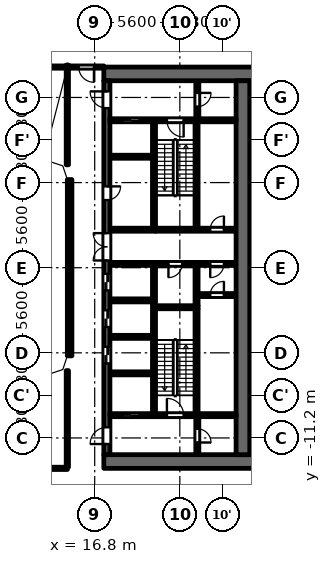
"""IFC4 building model, lengths in metres.
Left out: names, types, materials, properties, quantities, classifications, styles, units other than length and angle.
Written with IfcOpenShell. Run it as: python <this file> out.ifc"""

import sys

from ifc_helpers import new_model, si_unit, direction, frame, frame_2d, origin, place, context, subcontext, project, spatial, polyline, rectangle, outline, extrude, element, fill, save


model = new_model("IFC4")
c1 = context("Model", 3, precision=1e-05, world=origin(), true_north=direction((0.0, 1.0)))
c2 = subcontext(c1, "Body", "Model", "MODEL_VIEW")
j1 = project(units=[si_unit("LENGTHUNIT", "METRE"), si_unit("PLANEANGLEUNIT", "RADIAN")], contexts=[c1])
p1 = place(None, origin())
s1 = spatial("IfcSite", under=j1, at=p1, CompositionType="ELEMENT")
p2 = place(p1, origin())
s2 = spatial("IfcBuilding", under=s1, at=p2, CompositionType="ELEMENT")
p3 = place(p2, frame((0.0, 0.0, 16.1)))
s3 = spatial("IfcBuildingStorey", under=s2, at=p3, CompositionType="ELEMENT", Elevation=16.1)
p4 = place(p3, frame((15.15, 5.8, 0.0), z_axis=(0.0, 0.0, 1.0), x_axis=(0.0, -1.0, 0.0)))
e1 = element("IfcWall", 1, at=p4, inside=s3, PredefinedType="SOLIDWALL", context=c2, shape_type="SweptSolid", body=[
    extrude(rectangle(XDim=11.6, YDim=0.3, at=frame_2d((5.8, 0.0))), origin(), (0.0, 0.0, 1.0), 4.45),
])
p5 = place(p3, frame((23.5, -2.5, 0.0), z_axis=(0.0, 0.0, 1.0), x_axis=(0.0, 1.0, 0.0)))
e2 = element("IfcWall", 2, at=p5, inside=s3, PredefinedType="PARTITIONING", context=c2, shape_type="SweptSolid", body=[
    extrude(rectangle(XDim=2.65, YDim=0.2, at=frame_2d((1.325, 0.0))), origin(), (0.0, 0.0, 1.0), 4.45),
])
p6 = place(p3, frame((20.7, 2.6, 0.0), z_axis=(0.0, 0.0, 1.0), x_axis=(0.0, 1.0, 0.0)))
e3 = element("IfcWall", 3, at=p6, inside=s3, PredefinedType="SHEAR", context=c2, shape_type="SweptSolid", body=[
    extrude(rectangle(XDim=7.0, YDim=0.2, at=frame_2d((3.5, 0.0))), origin(), (0.0, 0.0, 1.0), 4.45),
])
p7 = place(p3, frame((20.7, -9.6, 0.0), z_axis=(0.0, 0.0, 1.0), x_axis=(0.0, 1.0, 0.0)))
e4 = element("IfcWall", 4, at=p7, inside=s3, PredefinedType="SHEAR", context=c2, shape_type="SweptSolid", body=[
    extrude(rectangle(XDim=9.75, YDim=0.2, at=frame_2d((4.875, 0.0))), origin(), (0.0, 0.0, 1.0), 4.45),
])
p8 = place(p3, frame((20.8, 2.5, 0.0), z_axis=(0.0, 0.0, 1.0), x_axis=(1.0, 0.0, 0.0)))
e5 = element("IfcWall", 5, at=p8, inside=s3, PredefinedType="SHEAR", context=c2, shape_type="SweptSolid", body=[
    extrude(rectangle(XDim=5.3, YDim=0.2, at=frame_2d((2.65, 0.0))), origin(), (0.0, 0.0, 1.0), 4.45),
])
p9 = place(p8, frame((3.6, 0.0, 0.0)))
e6 = element("IfcOpeningElement", 6, at=p9, cuts=e5, PredefinedType="OPENING", context=c2, shape_type="SweptSolid", body=[
    extrude(rectangle(XDim=0.9, YDim=2.1, at=frame_2d((0.45, 1.05))), frame((0.0, 0.11, 0.0), z_axis=(0.0, -1.0, 0.0), x_axis=(1.0, 0.0, 0.0)), (0.0, 0.0, 1.0), 0.22),
])
p10 = place(p3, frame((20.8, 0.25, 0.0), z_axis=(0.0, 0.0, 1.0), x_axis=(1.0, 0.0, 0.0)))
e7 = element("IfcWall", 7, at=p10, inside=s3, PredefinedType="PARTITIONING", context=c2, shape_type="SweptSolid", body=[
    extrude(rectangle(XDim=5.3, YDim=0.2, at=frame_2d((2.65, 0.0))), origin(), (0.0, 0.0, 1.0), 4.45),
])
p11 = place(p10, frame((0.85, 0.0, 0.0)))
e8 = element("IfcOpeningElement", 8, at=p11, cuts=e7, PredefinedType="OPENING", context=c2, shape_type="SweptSolid", body=[
    extrude(rectangle(XDim=0.9, YDim=2.1, at=frame_2d((0.45, 1.05))), frame((0.0, 0.11, 0.0), z_axis=(0.0, -1.0, 0.0), x_axis=(1.0, 0.0, 0.0)), (0.0, 0.0, 1.0), 0.22),
])
p12 = place(p10, frame((3.6, 0.0, 0.0)))
e9 = element("IfcOpeningElement", 9, at=p12, cuts=e7, PredefinedType="OPENING", context=c2, shape_type="SweptSolid", body=[
    extrude(rectangle(XDim=0.9, YDim=2.1, at=frame_2d((0.45, 1.05))), frame((0.0, 0.11, 0.0), z_axis=(0.0, -1.0, 0.0), x_axis=(1.0, 0.0, 0.0)), (0.0, 0.0, 1.0), 0.22),
])
for number, where, z_axis, x_axis in (
    (10, (17.4, 12.75, 0.0), (0.0, 0.0, 1.0), (1.0, 0.0, 0.0)),
    (11, (17.4, -12.75, 0.0), (0.0, 0.0, 1.0), (1.0, 0.0, 0.0)),
):
    element("IfcWall", number, at=place(p3, frame(where, z_axis=z_axis, x_axis=x_axis)), inside=s3, PredefinedType="SHEAR", context=c2, shape_type="SweptSolid", body=[
        extrude(rectangle(XDim=10.4, YDim=0.9, at=frame_2d((5.2, 0.0))), origin(), (0.0, 0.0, 1.0), 4.45),
    ])
p13 = place(p3, frame((17.6, -12.3, 0.0), z_axis=(0.0, 0.0, 1.0), x_axis=(0.0, 1.0, 0.0)))
e12 = element("IfcWall", 12, at=p13, inside=s3, PredefinedType="SHEAR", context=c2, shape_type="SweptSolid", body=[
    extrude(rectangle(XDim=24.6, YDim=0.4, at=frame_2d((12.3, 0.0))), origin(), (0.0, 0.0, 1.0), 4.45),
])
p14 = place(p13, frame((6.0, 0.0, 0.0)))
e13 = element("IfcOpeningElement", 13, at=p14, cuts=e12, PredefinedType="OPENING", context=c2, shape_type="SweptSolid", body=[
    extrude(rectangle(XDim=1.1, YDim=2.1, at=frame_2d((0.55, 1.05))), frame((0.0, 0.21, 0.0), z_axis=(0.0, -1.0, 0.0), x_axis=(1.0, 0.0, 0.0)), (0.0, 0.0, 1.0), 0.42),
])
p15 = place(p13, frame((8.4, 0.0, 0.0)))
e14 = element("IfcOpeningElement", 14, at=p15, cuts=e12, PredefinedType="OPENING", context=c2, shape_type="SweptSolid", body=[
    extrude(rectangle(XDim=1.1, YDim=2.1, at=frame_2d((0.55, 1.05))), frame((0.0, 0.21, 0.0), z_axis=(0.0, -1.0, 0.0), x_axis=(1.0, 0.0, 0.0)), (0.0, 0.0, 1.0), 0.42),
])
p16 = place(p13, frame((10.8, 0.0, 0.0)))
e15 = element("IfcOpeningElement", 15, at=p16, cuts=e12, PredefinedType="OPENING", context=c2, shape_type="SweptSolid", body=[
    extrude(rectangle(XDim=1.1, YDim=2.1, at=frame_2d((0.55, 1.05))), frame((0.0, 0.21, 0.0), z_axis=(0.0, -1.0, 0.0), x_axis=(1.0, 0.0, 0.0)), (0.0, 0.0, 1.0), 0.42),
])
p17 = place(p13, frame((16.75, 0.0, 0.0)))
e16 = element("IfcOpeningElement", 16, at=p17, cuts=e12, PredefinedType="OPENING", context=c2, shape_type="SweptSolid", body=[
    extrude(rectangle(XDim=0.9, YDim=2.1, at=frame_2d((0.45, 1.05))), frame((0.0, 0.21, 0.0), z_axis=(0.0, -1.0, 0.0), x_axis=(1.0, 0.0, 0.0)), (0.0, 0.0, 1.0), 0.42),
])
p18 = place(p13, frame((22.8, 0.0, 0.0)))
e17 = element("IfcOpeningElement", 17, at=p18, cuts=e12, PredefinedType="OPENING", context=c2, shape_type="SweptSolid", body=[
    extrude(rectangle(XDim=1.1, YDim=2.1, at=frame_2d((0.55, 1.05))), frame((0.0, 0.21, 0.0), z_axis=(0.0, -1.0, 0.0), x_axis=(1.0, 0.0, 0.0)), (0.0, 0.0, 1.0), 0.42),
])
p19 = place(p13, frame((0.7, 0.0, 0.0)))
e18 = element("IfcOpeningElement", 18, at=p19, cuts=e12, PredefinedType="OPENING", context=c2, shape_type="SweptSolid", body=[
    extrude(rectangle(XDim=1.1, YDim=2.1, at=frame_2d((0.55, 1.05))), frame((0.0, 0.21, 0.0), z_axis=(0.0, -1.0, 0.0), x_axis=(1.0, 0.0, 0.0)), (0.0, 0.0, 1.0), 0.42),
])
p20 = place(p13, frame((12.775, 0.0, 0.0)))
e19 = element("IfcOpeningElement", 19, at=p20, cuts=e12, PredefinedType="OPENING", context=c2, shape_type="SweptSolid", body=[
    extrude(rectangle(XDim=1.8, YDim=2.1, at=frame_2d((0.9, 1.05))), frame((0.0, 0.21, 0.0), z_axis=(0.0, -1.0, 0.0), x_axis=(1.0, 0.0, 0.0)), (0.0, 0.0, 1.0), 0.42),
])
p21 = place(p3, frame((26.55, -12.3, 0.0), z_axis=(0.0, 0.0, 1.0), x_axis=(0.0, 1.0, 0.0)))
e20 = element("IfcWall", 20, at=p21, inside=s3, PredefinedType="SHEAR", context=c2, shape_type="SweptSolid", body=[
    extrude(rectangle(XDim=24.6, YDim=0.9, at=frame_2d((12.3, 0.0))), origin(), (0.0, 0.0, 1.0), 4.45),
])
p22 = place(p3, frame((23.55, 9.8, 0.0), z_axis=(0.0, 0.0, 1.0), x_axis=(0.0, 1.0, 0.0)))
e21 = element("IfcWall", 21, at=p22, inside=s3, PredefinedType="PARTITIONING", context=c2, shape_type="SweptSolid", body=[
    extrude(rectangle(XDim=2.5, YDim=0.2, at=frame_2d((1.25, 0.0))), origin(), (0.0, 0.0, 1.0), 4.45),
])
p23 = place(p22, frame((0.8, 0.0, 0.0)))
e22 = element("IfcOpeningElement", 22, at=p23, cuts=e21, PredefinedType="OPENING", context=c2, shape_type="SweptSolid", body=[
    extrude(rectangle(XDim=0.9, YDim=2.1, at=frame_2d((0.45, 1.05))), frame((0.0, 0.11, 0.0), z_axis=(0.0, -1.0, 0.0), x_axis=(1.0, 0.0, 0.0)), (0.0, 0.0, 1.0), 0.22),
])
p24 = place(p3, frame((23.55, -12.3, 0.0), z_axis=(0.0, 0.0, 1.0), x_axis=(0.0, 1.0, 0.0)))
e23 = element("IfcWall", 23, at=p24, inside=s3, PredefinedType="PARTITIONING", context=c2, shape_type="SweptSolid", body=[
    extrude(rectangle(XDim=2.5, YDim=0.2, at=frame_2d((1.25, 0.0))), origin(), (0.0, 0.0, 1.0), 4.45),
])
p25 = place(p24, frame((0.8, 0.0, 0.0)))
e24 = element("IfcOpeningElement", 24, at=p25, cuts=e23, PredefinedType="OPENING", context=c2, shape_type="SweptSolid", body=[
    extrude(rectangle(XDim=0.9, YDim=2.1, at=frame_2d((0.45, 1.05))), frame((0.0, 0.11, 0.0), z_axis=(0.0, -1.0, 0.0), x_axis=(1.0, 0.0, 0.0)), (0.0, 0.0, 1.0), 0.22),
])
p26 = place(p3, frame((23.6, -1.8, 0.0), z_axis=(0.0, 0.0, 1.0), x_axis=(1.0, 0.0, 0.0)))
e25 = element("IfcWall", 25, at=p26, inside=s3, PredefinedType="PARTITIONING", context=c2, shape_type="SweptSolid", body=[
    extrude(rectangle(XDim=2.5, YDim=0.2, at=frame_2d((1.25, 0.0))), origin(), (0.0, 0.0, 1.0), 4.45),
])
p27 = place(p26, frame((0.8, 0.0, 0.0)))
e26 = element("IfcOpeningElement", 26, at=p27, cuts=e25, PredefinedType="OPENING", context=c2, shape_type="SweptSolid", body=[
    extrude(rectangle(XDim=0.9, YDim=2.1, at=frame_2d((0.45, 1.05))), frame((0.0, 0.11, 0.0), z_axis=(0.0, -1.0, 0.0), x_axis=(1.0, 0.0, 0.0)), (0.0, 0.0, 1.0), 0.22),
])
p28 = place(p3, frame((17.8, -9.7, 0.0), z_axis=(0.0, 0.0, 1.0), x_axis=(1.0, 0.0, 0.0)))
e27 = element("IfcWall", 27, at=p28, inside=s3, PredefinedType="SHEAR", context=c2, shape_type="SweptSolid", body=[
    extrude(rectangle(XDim=8.3, YDim=0.2, at=frame_2d((4.15, 0.0))), origin(), (0.0, 0.0, 1.0), 4.45),
])
p29 = place(p28, frame((0.85, 0.0, 0.0)))
e28 = element("IfcOpeningElement", 28, at=p29, cuts=e27, PredefinedType="OPENING", context=c2, shape_type="SweptSolid", body=[
    extrude(rectangle(XDim=1.1, YDim=2.1, at=frame_2d((0.55, 1.05))), frame((0.0, 0.11, 0.0), z_axis=(0.0, -1.0, 0.0), x_axis=(1.0, 0.0, 0.0)), (0.0, 0.0, 1.0), 0.22),
])
p30 = place(p28, frame((3.75, 0.0, 0.0)))
e29 = element("IfcOpeningElement", 29, at=p30, cuts=e27, PredefinedType="OPENING", context=c2, shape_type="SweptSolid", body=[
    extrude(rectangle(XDim=1.1, YDim=2.1, at=frame_2d((0.55, 1.05))), frame((0.0, 0.11, 0.0), z_axis=(0.0, -1.0, 0.0), x_axis=(1.0, 0.0, 0.0)), (0.0, 0.0, 1.0), 0.22),
])
for number, where, z_axis, x_axis in (
    (30, (17.8, -6.95, 0.0), (0.0, 0.0, 1.0), (1.0, 0.0, 0.0)),
    (31, (17.8, -4.55, 0.0), (0.0, 0.0, 1.0), (1.0, 0.0, 0.0)),
    (32, (17.8, -2.15, 0.0), (0.0, 0.0, 1.0), (1.0, 0.0, 0.0)),
):
    element("IfcWall", number, at=place(p3, frame(where, z_axis=z_axis, x_axis=x_axis)), inside=s3, PredefinedType="PARTITIONING", context=c2, shape_type="SweptSolid", body=[
        extrude(rectangle(XDim=2.8, YDim=0.2, at=frame_2d((1.4, 0.0))), origin(), (0.0, 0.0, 1.0), 4.45),
    ])
for number, where, z_axis, x_axis in (
    (33, (17.8, 0.25, 0.0), (0.0, 0.0, 1.0), (1.0, 0.0, 0.0)),
    (34, (17.8, 2.5, 0.0), (0.0, 0.0, 1.0), (1.0, 0.0, 0.0)),
):
    element("IfcWall", number, at=place(p3, frame(where, z_axis=z_axis, x_axis=x_axis)), inside=s3, PredefinedType="PARTITIONING", context=c2, shape_type="SweptSolid", body=[
        extrude(rectangle(XDim=3.0, YDim=0.2, at=frame_2d((1.5, 0.0))), origin(), (0.0, 0.0, 1.0), 4.45),
    ])
p31 = place(p3, frame((17.8, 7.3, 0.0), z_axis=(0.0, 0.0, 1.0), x_axis=(1.0, 0.0, 0.0)))
e35 = element("IfcWall", 35, at=p31, inside=s3, PredefinedType="PARTITIONING", context=c2, shape_type="SweptSolid", body=[
    extrude(rectangle(XDim=2.8, YDim=0.2, at=frame_2d((1.4, 0.0))), origin(), (0.0, 0.0, 1.0), 4.45),
])
p32 = place(p3, frame((17.8, 9.7, 0.0), z_axis=(0.0, 0.0, 1.0), x_axis=(1.0, 0.0, 0.0)))
e36 = element("IfcWall", 36, at=p32, inside=s3, PredefinedType="SHEAR", context=c2, shape_type="SweptSolid", body=[
    extrude(rectangle(XDim=8.3, YDim=0.2, at=frame_2d((4.15, 0.0))), origin(), (0.0, 0.0, 1.0), 4.45),
])
p33 = place(p32, frame((0.85, 0.0, 0.0)))
e37 = element("IfcOpeningElement", 37, at=p33, cuts=e36, PredefinedType="OPENING", context=c2, shape_type="SweptSolid", body=[
    extrude(rectangle(XDim=1.1, YDim=2.1, at=frame_2d((0.55, 1.05))), frame((0.0, 0.11, 0.0), z_axis=(0.0, -1.0, 0.0), x_axis=(1.0, 0.0, 0.0)), (0.0, 0.0, 1.0), 0.22),
])
p34 = place(p32, frame((3.75, 0.0, 0.0)))
e38 = element("IfcOpeningElement", 38, at=p34, cuts=e36, PredefinedType="OPENING", context=c2, shape_type="SweptSolid", body=[
    extrude(rectangle(XDim=1.1, YDim=2.1, at=frame_2d((0.55, 1.05))), frame((0.0, 0.11, 0.0), z_axis=(0.0, -1.0, 0.0), x_axis=(1.0, 0.0, 0.0)), (0.0, 0.0, 1.0), 0.22),
])
p35 = place(p3, frame((23.5, 2.6, 0.0), z_axis=(0.0, 0.0, 1.0), x_axis=(0.0, 1.0, 0.0)))
e39 = element("IfcWall", 39, at=p35, inside=s3, PredefinedType="SHEAR", context=c2, shape_type="SweptSolid", body=[
    extrude(rectangle(XDim=7.0, YDim=0.2, at=frame_2d((3.5, 0.0))), origin(), (0.0, 0.0, 1.0), 4.45),
])
p36 = place(p3, frame((23.5, -9.6, 0.0), z_axis=(0.0, 0.0, 1.0), x_axis=(0.0, 1.0, 0.0)))
e40 = element("IfcWall", 40, at=p36, inside=s3, PredefinedType="SHEAR", context=c2, shape_type="SweptSolid", body=[
    extrude(rectangle(XDim=6.9, YDim=0.2, at=frame_2d((3.45, 0.0))), origin(), (0.0, 0.0, 1.0), 4.45),
])
p37 = place(p3, frame((20.8, -2.6, 0.0), z_axis=(0.0, 0.0, 1.0), x_axis=(1.0, 0.0, 0.0)))
e41 = element("IfcWall", 41, at=p37, inside=s3, PredefinedType="SHEAR", context=c2, shape_type="SweptSolid", body=[
    extrude(rectangle(XDim=2.8, YDim=0.2, at=frame_2d((1.4, 0.0))), origin(), (0.0, 0.0, 1.0), 4.45),
])
p38 = place(p3, frame((-15.005, -13.2, 0.0), z_axis=(0.0, 0.0, 1.0), x_axis=(1.0, 0.0, 0.0)))
e42 = element("IfcWall", 42, at=p38, inside=s3, PredefinedType="PARTITIONING", context=c2, shape_type="SweptSolid", body=[
    extrude(rectangle(XDim=30.01, YDim=0.15, at=frame_2d((15.005, 0.0))), origin(), (0.0, 0.0, 1.0), 4.45),
])
p39 = place(p38, frame((16.855, 0.0, 0.0)))
e43 = element("IfcOpeningElement", 43, at=p39, cuts=e42, PredefinedType="OPENING", context=c2, shape_type="SweptSolid", body=[
    extrude(rectangle(XDim=1.8, YDim=2.1, at=frame_2d((0.9, 1.05))), frame((0.0, 0.085, 0.0), z_axis=(0.0, -1.0, 0.0), x_axis=(1.0, 0.0, 0.0)), (0.0, 0.0, 1.0), 0.17),
])
p40 = place(p3, frame((-17.4, 13.2, 0.0), z_axis=(0.0, 0.0, 1.0), x_axis=(1.0, 0.0, 0.0)))
e44 = element("IfcWall", 44, at=p40, inside=s3, PredefinedType="PARTITIONING", context=c2, shape_type="SweptSolid", body=[
    extrude(rectangle(XDim=34.8, YDim=0.15, at=frame_2d((17.4, 0.0))), origin(), (0.0, 0.0, 1.0), 4.45),
])
p41 = place(p40, frame((3.05, 0.0, 0.0)))
e45 = element("IfcOpeningElement", 45, at=p41, cuts=e44, PredefinedType="OPENING", context=c2, shape_type="SweptSolid", body=[
    extrude(rectangle(XDim=1.8, YDim=2.1, at=frame_2d((0.9, 1.05))), frame((0.0, 0.085, 0.0), z_axis=(0.0, -1.0, 0.0), x_axis=(1.0, 0.0, 0.0)), (0.0, 0.0, 1.0), 0.17),
])
p42 = place(p40, frame((0.75, 0.0, 0.0)))
e46 = element("IfcOpeningElement", 46, at=p42, cuts=e44, PredefinedType="OPENING", context=c2, shape_type="SweptSolid", body=[
    extrude(rectangle(XDim=1.0, YDim=2.1, at=frame_2d((0.5, 1.05))), frame((0.0, 0.085, 0.0), z_axis=(0.0, -1.0, 0.0), x_axis=(1.0, 0.0, 0.0)), (0.0, 0.0, 1.0), 0.17),
])
p43 = place(p40, frame((33.15, 0.0, 0.0)))
e47 = element("IfcOpeningElement", 47, at=p43, cuts=e44, PredefinedType="OPENING", context=c2, shape_type="SweptSolid", body=[
    extrude(rectangle(XDim=1.0, YDim=2.1, at=frame_2d((0.5, 1.05))), frame((0.0, 0.085, 0.0), z_axis=(0.0, -1.0, 0.0), x_axis=(1.0, 0.0, 0.0)), (0.0, 0.0, 1.0), 0.17),
])
for number, where, z_axis, x_axis in (
    (48, (15.0, -13.125, 0.0), (0.0, 0.0, 1.0), (0.0, 1.0, 0.0)),
    (49, (15.0, 6.769, 0.0), (0.0, 0.0, 1.0), (0.0, 1.0, 0.0)),
):
    element("IfcWall", number, at=place(p3, frame(where, z_axis=z_axis, x_axis=x_axis)), inside=s3, PredefinedType="PARTITIONING", context=c2, shape_type="SweptSolid", body=[
        extrude(rectangle(XDim=6.356, YDim=0.15, at=frame_2d((3.178, 0.0))), origin(), (0.0, 0.0, 1.0), 4.45),
    ])
p44 = place(p3, origin())
e50 = element("IfcWall", 50, at=p44, inside=s3, PredefinedType="SOLIDWALL", context=c2, shape_type="SweptSolid", body=[
    extrude(outline(polyline([(14.937, 6.937), (13.849, 7.3), (13.8, 7.3), (13.8, 7.0), (14.7, 6.7), (15.0, 5.8), (15.3, 5.8), (15.3, 5.849), (14.937, 6.937)])), origin(), (0.0, 0.0, 1.0), 4.45),
])
e51 = element("IfcWall", 51, at=p44, inside=s3, PredefinedType="SOLIDWALL", context=c2, shape_type="SweptSolid", body=[
    extrude(outline(polyline([(14.937, -6.937), (15.3, -5.849), (15.3, -5.8), (15.0, -5.8), (14.7, -6.7), (13.8, -7.0), (13.8, -7.3), (13.849, -7.3), (14.937, -6.937)])), origin(), (0.0, 0.0, 1.0), 4.45),
])
p45 = place(p29, origin())
e52 = element("IfcDoor", 52, at=p45, inside=s3, OperationType="DOUBLE_DOOR_SLIDING", PredefinedType="DOOR", context=c2, shape_type="SweptSolid", body=[
    extrude(rectangle(XDim=1.1, YDim=2.1, at=frame_2d((0.55, 1.05))), frame((0.0, 0.025, 0.0), z_axis=(0.0, -1.0, 0.0), x_axis=(1.0, 0.0, 0.0)), (0.0, 0.0, 1.0), 0.05),
])
fill(e28, e52)
p46 = place(p14, origin())
e53 = element("IfcDoor", 53, at=p46, inside=s3, OperationType="DOUBLE_DOOR_SLIDING", PredefinedType="DOOR", context=c2, shape_type="SweptSolid", body=[
    extrude(rectangle(XDim=1.1, YDim=2.1, at=frame_2d((0.55, 1.05))), frame((0.0, 0.025, 0.0), z_axis=(0.0, -1.0, 0.0), x_axis=(1.0, 0.0, 0.0)), (0.0, 0.0, 1.0), 0.05),
])
fill(e13, e53)
p47 = place(p15, origin())
e54 = element("IfcDoor", 54, at=p47, inside=s3, OperationType="DOUBLE_DOOR_SLIDING", PredefinedType="DOOR", context=c2, shape_type="SweptSolid", body=[
    extrude(rectangle(XDim=1.1, YDim=2.1, at=frame_2d((0.55, 1.05))), frame((0.0, 0.025, 0.0), z_axis=(0.0, -1.0, 0.0), x_axis=(1.0, 0.0, 0.0)), (0.0, 0.0, 1.0), 0.05),
])
fill(e14, e54)
p48 = place(p16, origin())
e55 = element("IfcDoor", 55, at=p48, inside=s3, OperationType="DOUBLE_DOOR_SLIDING", PredefinedType="DOOR", context=c2, shape_type="SweptSolid", body=[
    extrude(rectangle(XDim=1.1, YDim=2.1, at=frame_2d((0.55, 1.05))), frame((0.0, 0.025, 0.0), z_axis=(0.0, -1.0, 0.0), x_axis=(1.0, 0.0, 0.0)), (0.0, 0.0, 1.0), 0.05),
])
fill(e15, e55)
p49 = place(p17, origin())
e56 = element("IfcDoor", 56, at=p49, inside=s3, OperationType="SINGLE_SWING_RIGHT", PredefinedType="DOOR", context=c2, shape_type="SweptSolid", body=[
    extrude(rectangle(XDim=0.9, YDim=2.1, at=frame_2d((0.45, 1.05))), frame((0.0, 0.025, 0.0), z_axis=(0.0, -1.0, 0.0), x_axis=(1.0, 0.0, 0.0)), (0.0, 0.0, 1.0), 0.05),
])
fill(e16, e56)
p50 = place(p33, origin())
e57 = element("IfcDoor", 57, at=p50, inside=s3, OperationType="DOUBLE_DOOR_SLIDING", PredefinedType="DOOR", context=c2, shape_type="SweptSolid", body=[
    extrude(rectangle(XDim=1.1, YDim=2.1, at=frame_2d((0.55, 1.05))), frame((0.0, 0.025, 0.0), z_axis=(0.0, -1.0, 0.0), x_axis=(1.0, 0.0, 0.0)), (0.0, 0.0, 1.0), 0.05),
])
fill(e37, e57)
p51 = place(p18, origin())
e58 = element("IfcDoor", 58, at=p51, inside=s3, OperationType="SINGLE_SWING_LEFT", PredefinedType="DOOR", context=c2, shape_type="SweptSolid", body=[
    extrude(rectangle(XDim=1.1, YDim=2.1, at=frame_2d((0.55, 1.05))), frame((0.0, 0.025, 0.0), z_axis=(0.0, -1.0, 0.0), x_axis=(1.0, 0.0, 0.0)), (0.0, 0.0, 1.0), 0.05),
])
fill(e17, e58)
p52 = place(p19, origin())
e59 = element("IfcDoor", 59, at=p52, inside=s3, OperationType="SINGLE_SWING_RIGHT", PredefinedType="DOOR", context=c2, shape_type="SweptSolid", body=[
    extrude(rectangle(XDim=1.1, YDim=2.1, at=frame_2d((0.55, 1.05))), frame((0.0, 0.025, 0.0), z_axis=(0.0, -1.0, 0.0), x_axis=(1.0, 0.0, 0.0)), (0.0, 0.0, 1.0), 0.05),
])
fill(e18, e59)
p53 = place(p23, origin())
e60 = element("IfcDoor", 60, at=p53, inside=s3, OperationType="SINGLE_SWING_RIGHT", PredefinedType="DOOR", context=c2, shape_type="SweptSolid", body=[
    extrude(rectangle(XDim=0.9, YDim=2.1, at=frame_2d((0.45, 1.05))), frame((0.0, 0.025, 0.0), z_axis=(0.0, -1.0, 0.0), x_axis=(1.0, 0.0, 0.0)), (0.0, 0.0, 1.0), 0.05),
])
fill(e22, e60)
p54 = place(p25, origin())
e61 = element("IfcDoor", 61, at=p54, inside=s3, OperationType="SINGLE_SWING_LEFT", PredefinedType="DOOR", context=c2, shape_type="SweptSolid", body=[
    extrude(rectangle(XDim=0.9, YDim=2.1, at=frame_2d((0.45, 1.05))), frame((0.0, 0.025, 0.0), z_axis=(0.0, -1.0, 0.0), x_axis=(1.0, 0.0, 0.0)), (0.0, 0.0, 1.0), 0.05),
])
fill(e24, e61)
p55 = place(p34, origin())
e62 = element("IfcDoor", 62, at=p55, inside=s3, OperationType="SINGLE_SWING_RIGHT", PredefinedType="DOOR", context=c2, shape_type="SweptSolid", body=[
    extrude(rectangle(XDim=1.1, YDim=2.1, at=frame_2d((0.55, 1.05))), frame((0.0, 0.025, 0.0), z_axis=(0.0, -1.0, 0.0), x_axis=(1.0, 0.0, 0.0)), (0.0, 0.0, 1.0), 0.05),
])
fill(e38, e62)
p56 = place(p30, origin())
e63 = element("IfcDoor", 63, at=p56, inside=s3, OperationType="SINGLE_SWING_RIGHT", PredefinedType="DOOR", context=c2, shape_type="SweptSolid", body=[
    extrude(rectangle(XDim=1.1, YDim=2.1, at=frame_2d((0.55, 1.05))), frame((0.0, 0.025, 0.0), z_axis=(0.0, -1.0, 0.0), x_axis=(1.0, 0.0, 0.0)), (0.0, 0.0, 1.0), 0.05),
])
fill(e29, e63)
p57 = place(p20, origin())
e64 = element("IfcDoor", 64, at=p57, inside=s3, OperationType="DOUBLE_DOOR_SINGLE_SWING", PredefinedType="DOOR", context=c2, shape_type="SweptSolid", body=[
    extrude(rectangle(XDim=1.8, YDim=2.1, at=frame_2d((0.9, 1.05))), frame((0.0, 0.025, 0.0), z_axis=(0.0, -1.0, 0.0), x_axis=(1.0, 0.0, 0.0)), (0.0, 0.0, 1.0), 0.05),
])
fill(e19, e64)
p58 = place(p11, origin())
e65 = element("IfcDoor", 65, at=p58, inside=s3, OperationType="SINGLE_SWING_LEFT", PredefinedType="DOOR", context=c2, shape_type="SweptSolid", body=[
    extrude(rectangle(XDim=0.9, YDim=2.1, at=frame_2d((0.45, 1.05))), frame((0.0, 0.025, 0.0), z_axis=(0.0, -1.0, 0.0), x_axis=(1.0, 0.0, 0.0)), (0.0, 0.0, 1.0), 0.05),
])
fill(e8, e65)
p59 = place(p27, origin())
e66 = element("IfcDoor", 66, at=p59, inside=s3, OperationType="SINGLE_SWING_LEFT", PredefinedType="DOOR", context=c2, shape_type="SweptSolid", body=[
    extrude(rectangle(XDim=0.9, YDim=2.1, at=frame_2d((0.45, 1.05))), frame((0.0, 0.025, 0.0), z_axis=(0.0, -1.0, 0.0), x_axis=(1.0, 0.0, 0.0)), (0.0, 0.0, 1.0), 0.05),
])
fill(e26, e66)
p60 = place(p12, origin())
e67 = element("IfcDoor", 67, at=p60, inside=s3, OperationType="SINGLE_SWING_LEFT", PredefinedType="DOOR", context=c2, shape_type="SweptSolid", body=[
    extrude(rectangle(XDim=0.9, YDim=2.1, at=frame_2d((0.45, 1.05))), frame((0.0, 0.025, 0.0), z_axis=(0.0, -1.0, 0.0), x_axis=(1.0, 0.0, 0.0)), (0.0, 0.0, 1.0), 0.05),
])
fill(e9, e67)
p61 = place(p9, origin())
e68 = element("IfcDoor", 68, at=p61, inside=s3, OperationType="SINGLE_SWING_LEFT", PredefinedType="DOOR", context=c2, shape_type="SweptSolid", body=[
    extrude(rectangle(XDim=0.9, YDim=2.1, at=frame_2d((0.45, 1.05))), frame((0.0, 0.025, 0.0), z_axis=(0.0, -1.0, 0.0), x_axis=(1.0, 0.0, 0.0)), (0.0, 0.0, 1.0), 0.05),
])
fill(e6, e68)
p62 = place(p43, origin())
e69 = element("IfcDoor", 69, at=p62, inside=s3, OperationType="SINGLE_SWING_RIGHT", PredefinedType="DOOR", context=c2, shape_type="SweptSolid", body=[
    extrude(rectangle(XDim=1.0, YDim=2.1, at=frame_2d((0.5, 1.05))), frame((0.0, 0.025, 0.0), z_axis=(0.0, -1.0, 0.0), x_axis=(1.0, 0.0, 0.0)), (0.0, 0.0, 1.0), 0.05),
])
fill(e47, e69)
save(model, sys.argv[1])
